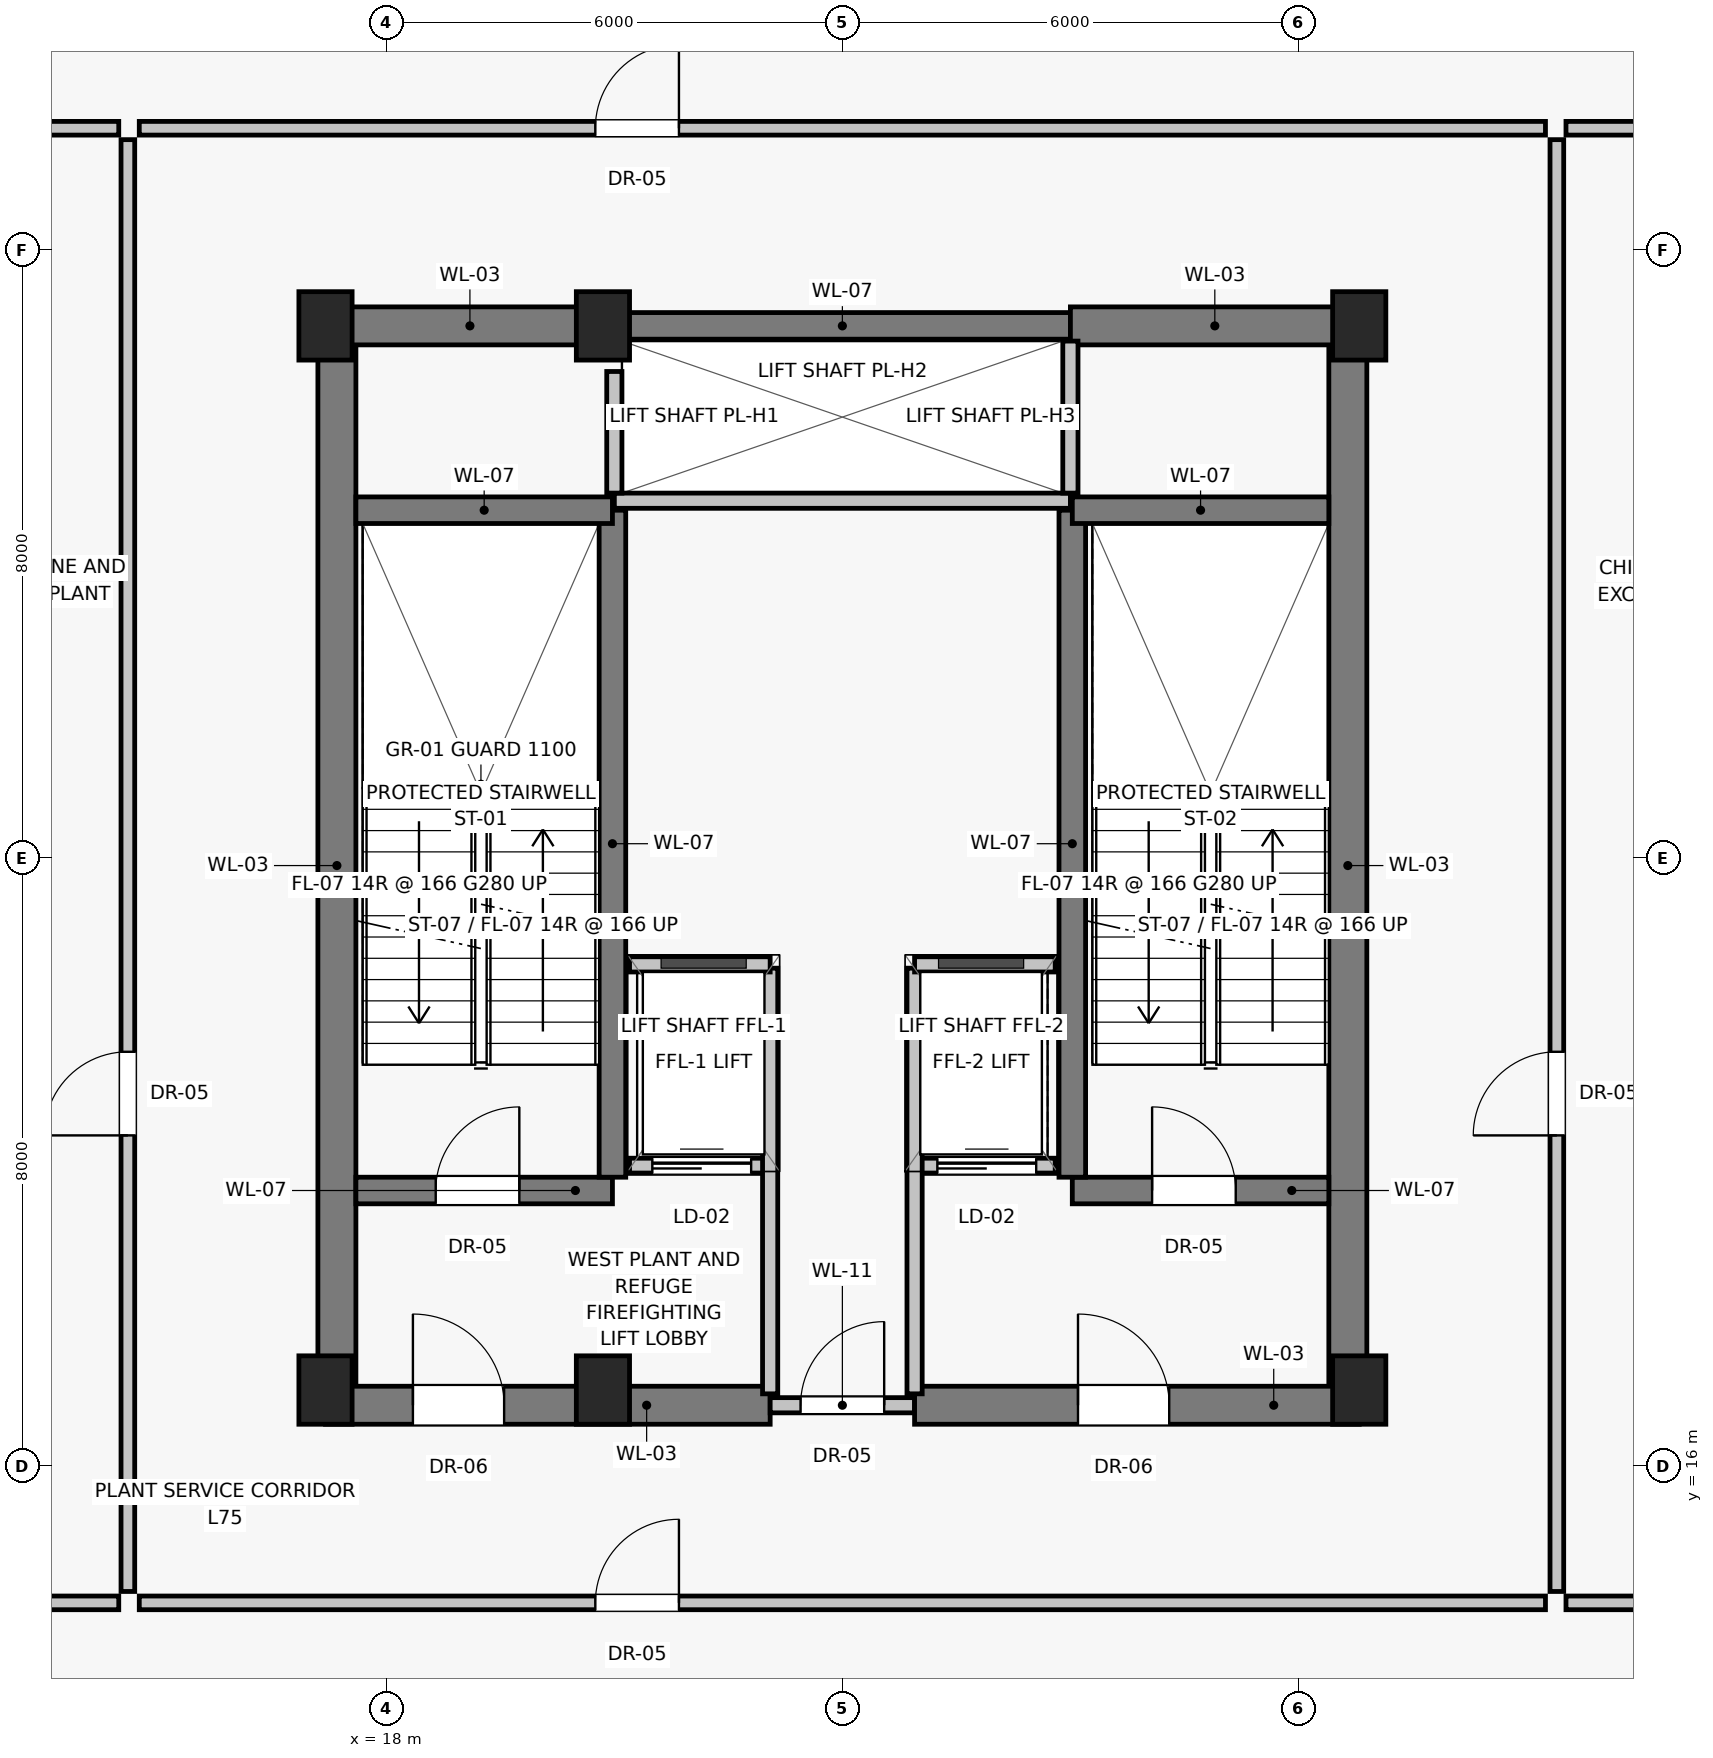
"""IFC4 building model, lengths in metres.
Left out: names, types, materials, properties, quantities, classifications, styles, units other than length and angle.
Written with IfcOpenShell. Run it as: python <this file> out.ifc"""

import sys

from ifc_helpers import new_model, si_unit, direction, frame, frame_2d, origin, origin_2d, place, context, subcontext, project, spatial, rectangle, extrude, source, transform, mapped, element, fill, save


model = new_model("IFC4")
c1 = context("Model", 3, precision=1e-05, world=origin(), true_north=direction((0.0, 1.0)))
c2 = subcontext(c1, "Body", "Model", "MODEL_VIEW")
j1 = project(units=[si_unit("LENGTHUNIT", "METRE"), si_unit("PLANEANGLEUNIT", "RADIAN")], contexts=[c1])
p1 = place(None, origin())
s1 = spatial("IfcSite", under=j1, at=p1, CompositionType="ELEMENT")
p2 = place(p1, origin())
s2 = spatial("IfcBuilding", under=s1, at=p2, CompositionType="ELEMENT")
p3 = place(p2, frame((0.0, 0.0, 264.25)))
s3 = spatial("IfcBuildingStorey", under=s2, at=p3, CompositionType="ELEMENT", Elevation=264.25)
for number, where, z_axis, x_axis in (
    (1, (17.2, 17.0, 0.0), (0.0, 0.0, 1.0), (1.0, 0.0, 0.0)),
    (2, (20.85, 17.0, 0.0), (0.0, 0.0, 1.0), (1.0, 0.0, 0.0)),
    (3, (30.8, 17.0, 0.0), (0.0, 0.0, 1.0), (1.0, 0.0, 0.0)),
    (4, (17.2, 31.0, 0.0), (0.0, 0.0, 1.0), (1.0, 0.0, 0.0)),
    (5, (20.85, 31.0, 0.0), (0.0, 0.0, 1.0), (1.0, 0.0, 0.0)),
    (6, (30.8, 31.0, 0.0), (0.0, 0.0, 1.0), (1.0, 0.0, 0.0)),
):
    element("IfcColumn", number, at=place(p3, frame(where, z_axis=z_axis, x_axis=x_axis)), inside=s3, PredefinedType="PILASTER", context=c2, shape_type="SweptSolid", body=[
        extrude(rectangle(XDim=0.7, YDim=0.9, at=origin_2d()), origin(), (0.0, 0.0, 1.0), 4.65),
    ])
for number, where, z_axis, x_axis in (
    (7, (17.35, 16.8, 0.0), (0.0, 0.0, 1.0), (0.0, 1.0, 0.0)),
    (8, (30.65, 16.8, 0.0), (0.0, 0.0, 1.0), (0.0, 1.0, 0.0)),
):
    element("IfcWall", number, at=place(p3, frame(where, z_axis=z_axis, x_axis=x_axis)), inside=s3, PredefinedType="SHEAR", context=c2, shape_type="SweptSolid", body=[
        extrude(rectangle(XDim=14.2, YDim=0.5, at=frame_2d((7.1, 0.0))), origin(), (0.0, 0.0, 1.0), 4.39),
    ])
p4 = place(p3, frame((17.2, 16.8, 0.0), z_axis=(0.0, 0.0, 1.0), x_axis=(1.0, 0.0, 0.0)))
e9 = element("IfcWall", 9, at=p4, inside=s3, PredefinedType="SHEAR", context=c2, shape_type="SweptSolid", body=[
    extrude(rectangle(XDim=5.85, YDim=0.5, at=frame_2d((2.925, 0.0))), origin(), (0.0, 0.0, 1.0), 4.39),
])
p5 = place(p4, frame((1.15, 0.0, 0.0)))
e10 = element("IfcOpeningElement", 10, at=p5, cuts=e9, PredefinedType="OPENING", context=c2, shape_type="SweptSolid", body=[
    extrude(rectangle(XDim=1.2, YDim=2.03, at=frame_2d((0.6, 1.015))), frame((0.0, 0.26, 0.0), z_axis=(0.0, -1.0, 0.0), x_axis=(1.0, 0.0, 0.0)), (0.0, 0.0, 1.0), 0.52),
])
p6 = place(p3, frame((23.05, 16.8, 0.0), z_axis=(0.0, 0.0, 1.0), x_axis=(1.0, 0.0, 0.0)))
e11 = element("IfcWall", 11, at=p6, inside=s3, PredefinedType="SOLIDWALL", context=c2, shape_type="SweptSolid", body=[
    extrude(rectangle(XDim=1.9, YDim=0.2, at=frame_2d((0.95, 0.0))), origin(), (0.0, 0.0, 1.0), 3.54),
])
p7 = place(p6, frame((0.4, 0.0, 0.0)))
e12 = element("IfcOpeningElement", 12, at=p7, cuts=e11, PredefinedType="OPENING", context=c2, shape_type="SweptSolid", body=[
    extrude(rectangle(XDim=1.1, YDim=2.03, at=frame_2d((0.55, 1.015))), frame((0.0, 0.11, 0.0), z_axis=(0.0, -1.0, 0.0), x_axis=(1.0, 0.0, 0.0)), (0.0, 0.0, 1.0), 0.22),
])
p8 = place(p3, frame((24.95, 16.8, 0.0), z_axis=(0.0, 0.0, 1.0), x_axis=(1.0, 0.0, 0.0)))
e13 = element("IfcWall", 13, at=p8, inside=s3, PredefinedType="SHEAR", context=c2, shape_type="SweptSolid", body=[
    extrude(rectangle(XDim=5.85, YDim=0.5, at=frame_2d((2.925, 0.0))), origin(), (0.0, 0.0, 1.0), 4.39),
])
p9 = place(p8, frame((2.15, 0.0, 0.0)))
e14 = element("IfcOpeningElement", 14, at=p9, cuts=e13, PredefinedType="OPENING", context=c2, shape_type="SweptSolid", body=[
    extrude(rectangle(XDim=1.2, YDim=2.03, at=frame_2d((0.6, 1.015))), frame((0.0, 0.26, 0.0), z_axis=(0.0, -1.0, 0.0), x_axis=(1.0, 0.0, 0.0)), (0.0, 0.0, 1.0), 0.52),
])
p10 = place(p3, frame((17.2, 31.0, 0.0), z_axis=(0.0, 0.0, 1.0), x_axis=(1.0, 0.0, 0.0)))
e15 = element("IfcWall", 15, at=p10, inside=s3, PredefinedType="SHEAR", context=c2, shape_type="SweptSolid", body=[
    extrude(rectangle(XDim=3.8, YDim=0.5, at=frame_2d((1.9, 0.0))), origin(), (0.0, 0.0, 1.0), 4.39),
])
p11 = place(p3, frame((21.0, 31.0, 0.0), z_axis=(0.0, 0.0, 1.0), x_axis=(1.0, 0.0, 0.0)))
e16 = element("IfcWall", 16, at=p11, inside=s3, PredefinedType="SHEAR", context=c2, shape_type="SweptSolid", body=[
    extrude(rectangle(XDim=6.0, YDim=0.35, at=frame_2d((3.0, 0.0))), origin(), (0.0, 0.0, 1.0), 4.39),
])
p12 = place(p3, frame((27.0, 31.0, 0.0), z_axis=(0.0, 0.0, 1.0), x_axis=(1.0, 0.0, 0.0)))
e17 = element("IfcWall", 17, at=p12, inside=s3, PredefinedType="SHEAR", context=c2, shape_type="SweptSolid", body=[
    extrude(rectangle(XDim=3.8, YDim=0.5, at=frame_2d((1.9, 0.0))), origin(), (0.0, 0.0, 1.0), 4.39),
])
p13 = place(p3, frame((17.6, 19.625, 0.0), z_axis=(0.0, 0.0, 1.0), x_axis=(1.0, 0.0, 0.0)))
e18 = element("IfcWall", 18, at=p13, inside=s3, PredefinedType="SHEAR", context=c2, shape_type="SweptSolid", body=[
    extrude(rectangle(XDim=3.375, YDim=0.35, at=frame_2d((1.688, 0.0))), origin(), (0.0, 0.0, 1.0), 4.39),
])
p14 = place(p13, frame((1.05, 0.0, 0.0)))
e19 = element("IfcOpeningElement", 19, at=p14, cuts=e18, PredefinedType="OPENING", context=c2, shape_type="SweptSolid", body=[
    extrude(rectangle(XDim=1.1, YDim=2.03, at=frame_2d((0.55, 1.015))), frame((0.0, 0.185, 0.0), z_axis=(0.0, -1.0, 0.0), x_axis=(1.0, 0.0, 0.0)), (0.0, 0.0, 1.0), 0.37),
])
p15 = place(p3, frame((21.2, 19.95, 0.0), z_axis=(0.0, 0.0, 1.0), x_axis=(1.0, 0.0, 0.0)))
e20 = element("IfcWall", 20, at=p15, inside=s3, PredefinedType="SOLIDWALL", context=c2, shape_type="SweptSolid", body=[
    extrude(rectangle(XDim=1.85, YDim=0.2, at=frame_2d((0.925, 0.0))), origin(), (0.0, 0.0, 1.0), 4.39),
])
p16 = place(p15, frame((0.3, 0.0, 0.0)))
e21 = element("IfcOpeningElement", 21, at=p16, cuts=e20, PredefinedType="OPENING", context=c2, shape_type="SweptSolid", body=[
    extrude(rectangle(XDim=1.3, YDim=2.25, at=frame_2d((0.65, 1.125))), frame((0.0, 0.11, 0.0), z_axis=(0.0, -1.0, 0.0), x_axis=(1.0, 0.0, 0.0)), (0.0, 0.0, 1.0), 0.22),
])
p17 = place(p3, frame((24.95, 19.95, 0.0), z_axis=(0.0, 0.0, 1.0), x_axis=(1.0, 0.0, 0.0)))
e22 = element("IfcWall", 22, at=p17, inside=s3, PredefinedType="SOLIDWALL", context=c2, shape_type="SweptSolid", body=[
    extrude(rectangle(XDim=1.85, YDim=0.2, at=frame_2d((0.925, 0.0))), origin(), (0.0, 0.0, 1.0), 4.39),
])
p18 = place(p17, frame((0.3, 0.0, 0.0)))
e23 = element("IfcOpeningElement", 23, at=p18, cuts=e22, PredefinedType="OPENING", context=c2, shape_type="SweptSolid", body=[
    extrude(rectangle(XDim=1.3, YDim=2.25, at=frame_2d((0.65, 1.125))), frame((0.0, 0.11, 0.0), z_axis=(0.0, -1.0, 0.0), x_axis=(1.0, 0.0, 0.0)), (0.0, 0.0, 1.0), 0.22),
])
p19 = place(p3, frame((27.025, 19.625, 0.0), z_axis=(0.0, 0.0, 1.0), x_axis=(1.0, 0.0, 0.0)))
e24 = element("IfcWall", 24, at=p19, inside=s3, PredefinedType="SHEAR", context=c2, shape_type="SweptSolid", body=[
    extrude(rectangle(XDim=3.375, YDim=0.35, at=frame_2d((1.688, 0.0))), origin(), (0.0, 0.0, 1.0), 4.39),
])
p20 = place(p19, frame((1.05, 0.0, 0.0)))
e25 = element("IfcOpeningElement", 25, at=p20, cuts=e24, PredefinedType="OPENING", context=c2, shape_type="SweptSolid", body=[
    extrude(rectangle(XDim=1.1, YDim=2.03, at=frame_2d((0.55, 1.015))), frame((0.0, 0.185, 0.0), z_axis=(0.0, -1.0, 0.0), x_axis=(1.0, 0.0, 0.0)), (0.0, 0.0, 1.0), 0.37),
])
for number, where, z_axis, x_axis in (
    (26, (20.975, 19.8, 0.0), (0.0, 0.0, 1.0), (0.0, 1.0, 0.0)),
    (27, (27.025, 19.8, 0.0), (0.0, 0.0, 1.0), (0.0, 1.0, 0.0)),
):
    element("IfcWall", number, at=place(p3, frame(where, z_axis=z_axis, x_axis=x_axis)), inside=s3, PredefinedType="SHEAR", context=c2, shape_type="SweptSolid", body=[
        extrude(rectangle(XDim=8.775, YDim=0.35, at=frame_2d((4.387, 0.0))), origin(), (0.0, 0.0, 1.0), 4.39),
    ])
for number, where, z_axis, x_axis in (
    (28, (17.6, 28.575, 0.0), (0.0, 0.0, 1.0), (1.0, 0.0, 0.0)),
    (29, (27.025, 28.575, 0.0), (0.0, 0.0, 1.0), (1.0, 0.0, 0.0)),
):
    element("IfcWall", number, at=place(p3, frame(where, z_axis=z_axis, x_axis=x_axis)), inside=s3, PredefinedType="SHEAR", context=c2, shape_type="SweptSolid", body=[
        extrude(rectangle(XDim=3.375, YDim=0.35, at=frame_2d((1.688, 0.0))), origin(), (0.0, 0.0, 1.0), 4.39),
    ])
for number, where, z_axis, x_axis in (
    (30, (23.05, 16.95, 0.0), (0.0, 0.0, 1.0), (0.0, 1.0, 0.0)),
    (31, (24.95, 16.95, 0.0), (0.0, 0.0, 1.0), (0.0, 1.0, 0.0)),
):
    element("IfcWall", number, at=place(p3, frame(where, z_axis=z_axis, x_axis=x_axis)), inside=s3, PredefinedType="SOLIDWALL", context=c2, shape_type="SweptSolid", body=[
        extrude(rectangle(XDim=5.6, YDim=0.2, at=frame_2d((2.8, 0.0))), origin(), (0.0, 0.0, 1.0), 4.39),
    ])
for number, where, z_axis, x_axis in (
    (32, (21.2, 22.6, 0.0), (0.0, 0.0, 1.0), (1.0, 0.0, 0.0)),
    (33, (24.95, 22.6, 0.0), (0.0, 0.0, 1.0), (1.0, 0.0, 0.0)),
):
    element("IfcWall", number, at=place(p3, frame(where, z_axis=z_axis, x_axis=x_axis)), inside=s3, PredefinedType="SOLIDWALL", context=c2, shape_type="SweptSolid", body=[
        extrude(rectangle(XDim=1.85, YDim=0.2, at=frame_2d((0.925, 0.0))), origin(), (0.0, 0.0, 1.0), 4.39),
    ])
p21 = place(p3, frame((21.0, 28.7, 0.0), z_axis=(0.0, 0.0, 1.0), x_axis=(1.0, 0.0, 0.0)))
e34 = element("IfcWall", 34, at=p21, inside=s3, PredefinedType="SOLIDWALL", context=c2, shape_type="SweptSolid", body=[
    extrude(rectangle(XDim=6.0, YDim=0.2, at=frame_2d((3.0, 0.0))), origin(), (0.0, 0.0, 1.0), 4.39),
])
p22 = place(p3, frame((21.0, 28.8, 0.0), z_axis=(0.0, 0.0, 1.0), x_axis=(0.0, 1.0, 0.0)))
e35 = element("IfcWall", 35, at=p22, inside=s3, PredefinedType="SOLIDWALL", context=c2, shape_type="SweptSolid", body=[
    extrude(rectangle(XDim=1.6, YDim=0.2, at=frame_2d((0.8, 0.0))), origin(), (0.0, 0.0, 1.0), 4.39),
])
p23 = place(p3, frame((27.0, 28.8, 0.0), z_axis=(0.0, 0.0, 1.0), x_axis=(0.0, 1.0, 0.0)))
e36 = element("IfcWall", 36, at=p23, inside=s3, PredefinedType="SOLIDWALL", context=c2, shape_type="SweptSolid", body=[
    extrude(rectangle(XDim=2.0, YDim=0.2, at=frame_2d((1.0, 0.0))), origin(), (0.0, 0.0, 1.0), 4.39),
])
p24 = place(p3, frame((14.75, 14.2, 0.0), z_axis=(0.0, 0.0, 1.0), x_axis=(1.0, 0.0, 0.0)))
e37 = element("IfcWall", 37, at=p24, inside=s3, PredefinedType="PARTITIONING", context=c2, shape_type="SweptSolid", body=[
    extrude(rectangle(XDim=18.5, YDim=0.18, at=frame_2d((9.25, 0.0))), origin(), (0.0, 0.0, 1.0), 4.39),
])
p25 = place(p24, frame((6.0, 0.0, 0.0)))
e38 = element("IfcOpeningElement", 38, at=p25, cuts=e37, PredefinedType="OPENING", context=c2, shape_type="SweptSolid", body=[
    extrude(rectangle(XDim=1.1, YDim=2.03, at=frame_2d((0.55, 1.015))), frame((0.0, 0.1, 0.0), z_axis=(0.0, -1.0, 0.0), x_axis=(1.0, 0.0, 0.0)), (0.0, 0.0, 1.0), 0.2),
])
p26 = place(p3, frame((33.4, 14.35, 0.0), z_axis=(0.0, 0.0, 1.0), x_axis=(0.0, 1.0, 0.0)))
e39 = element("IfcWall", 39, at=p26, inside=s3, PredefinedType="PARTITIONING", context=c2, shape_type="SweptSolid", body=[
    extrude(rectangle(XDim=19.1, YDim=0.18, at=frame_2d((9.55, 0.0))), origin(), (0.0, 0.0, 1.0), 4.39),
])
p27 = place(p26, frame((6.0, 0.0, 0.0)))
e40 = element("IfcOpeningElement", 40, at=p27, cuts=e39, PredefinedType="OPENING", context=c2, shape_type="SweptSolid", body=[
    extrude(rectangle(XDim=1.1, YDim=2.03, at=frame_2d((0.55, 1.015))), frame((0.0, 0.1, 0.0), z_axis=(0.0, -1.0, 0.0), x_axis=(1.0, 0.0, 0.0)), (0.0, 0.0, 1.0), 0.2),
])
p28 = place(p3, frame((14.75, 33.6, 0.0), z_axis=(0.0, 0.0, 1.0), x_axis=(1.0, 0.0, 0.0)))
e41 = element("IfcWall", 41, at=p28, inside=s3, PredefinedType="PARTITIONING", context=c2, shape_type="SweptSolid", body=[
    extrude(rectangle(XDim=18.5, YDim=0.18, at=frame_2d((9.25, 0.0))), origin(), (0.0, 0.0, 1.0), 4.39),
])
p29 = place(p28, frame((6.0, 0.0, 0.0)))
e42 = element("IfcOpeningElement", 42, at=p29, cuts=e41, PredefinedType="OPENING", context=c2, shape_type="SweptSolid", body=[
    extrude(rectangle(XDim=1.1, YDim=2.03, at=frame_2d((0.55, 1.015))), frame((0.0, 0.1, 0.0), z_axis=(0.0, -1.0, 0.0), x_axis=(1.0, 0.0, 0.0)), (0.0, 0.0, 1.0), 0.2),
])
p30 = place(p3, frame((14.6, 14.35, 0.0), z_axis=(0.0, 0.0, 1.0), x_axis=(0.0, 1.0, 0.0)))
e43 = element("IfcWall", 43, at=p30, inside=s3, PredefinedType="PARTITIONING", context=c2, shape_type="SweptSolid", body=[
    extrude(rectangle(XDim=19.1, YDim=0.18, at=frame_2d((9.55, 0.0))), origin(), (0.0, 0.0, 1.0), 4.39),
])
p31 = place(p30, frame((6.0, 0.0, 0.0)))
e44 = element("IfcOpeningElement", 44, at=p31, cuts=e43, PredefinedType="OPENING", context=c2, shape_type="SweptSolid", body=[
    extrude(rectangle(XDim=1.1, YDim=2.03, at=frame_2d((0.55, 1.015))), frame((0.0, 0.1, 0.0), z_axis=(0.0, -1.0, 0.0), x_axis=(1.0, 0.0, 0.0)), (0.0, 0.0, 1.0), 0.2),
])
for number, where, z_axis, x_axis in (
    (45, (11.17, 14.2, 0.0), (0.0, 0.0, 1.0), (1.0, 0.0, 0.0)),
    (46, (33.52, 14.2, 0.0), (0.0, 0.0, 1.0), (1.0, 0.0, 0.0)),
    (47, (11.17, 33.6, 0.0), (0.0, 0.0, 1.0), (1.0, 0.0, 0.0)),
    (48, (33.52, 33.6, 0.0), (0.0, 0.0, 1.0), (1.0, 0.0, 0.0)),
):
    element("IfcWall", number, at=place(p3, frame(where, z_axis=z_axis, x_axis=x_axis)), inside=s3, PredefinedType="PARTITIONING", context=c2, shape_type="SweptSolid", body=[
        extrude(rectangle(XDim=3.31, YDim=0.18, at=frame_2d((1.655, 0.0))), origin(), (0.0, 0.0, 1.0), 4.39),
    ])
m1 = source(origin(), c2, "Body", "SweptSolid", [
    extrude(rectangle(XDim=1.2, YDim=2.03, at=frame_2d((0.6, 1.015))), frame((0.0, 0.025, 0.0), z_axis=(0.0, -1.0, 0.0), x_axis=(1.0, 0.0, 0.0)), (0.0, 0.0, 1.0), 0.05),
])
p32 = place(p5, origin())
e49 = element("IfcDoor", 49, at=p32, inside=s3, OperationType="SINGLE_SWING_LEFT", PredefinedType="DOOR", context=c2, shape_type="MappedRepresentation", body=[
    mapped(m1, transform((0.0, 0.0, 0.0), scale=1.0)),
])
fill(e10, e49)
m2 = source(origin(), c2, "Body", "SweptSolid", [
    extrude(rectangle(XDim=1.1, YDim=2.03, at=frame_2d((0.55, 1.015))), frame((0.0, 0.025, 0.0), z_axis=(0.0, -1.0, 0.0), x_axis=(1.0, 0.0, 0.0)), (0.0, 0.0, 1.0), 0.05),
])
p33 = place(p7, origin())
e50 = element("IfcDoor", 50, at=p33, inside=s3, OperationType="SINGLE_SWING_RIGHT", PredefinedType="DOOR", context=c2, shape_type="MappedRepresentation", body=[
    mapped(m2, transform((0.0, 0.0, 0.0), scale=1.0)),
])
fill(e12, e50)
p34 = place(p9, origin())
e51 = element("IfcDoor", 51, at=p34, inside=s3, OperationType="SINGLE_SWING_LEFT", PredefinedType="DOOR", context=c2, shape_type="MappedRepresentation", body=[
    mapped(m1, transform((0.0, 0.0, 0.0), scale=1.0)),
])
fill(e14, e51)
p35 = place(p14, origin())
e52 = element("IfcDoor", 52, at=p35, inside=s3, OperationType="SINGLE_SWING_RIGHT", PredefinedType="DOOR", context=c2, shape_type="MappedRepresentation", body=[
    mapped(m2, transform((0.0, 0.0, 0.0), scale=1.0)),
])
fill(e19, e52)
m3 = source(origin(), c2, "Body", "SweptSolid", [
    extrude(rectangle(XDim=1.3, YDim=2.25, at=frame_2d((0.65, 1.125))), frame((0.0, 0.025, 0.0), z_axis=(0.0, -1.0, 0.0), x_axis=(1.0, 0.0, 0.0)), (0.0, 0.0, 1.0), 0.05),
])
p36 = place(p16, origin())
e53 = element("IfcDoor", 53, at=p36, inside=s3, OperationType="SLIDING_TO_LEFT", PredefinedType="DOOR", context=c2, shape_type="MappedRepresentation", body=[
    mapped(m3, transform((0.0, 0.0, 0.0), scale=1.0)),
])
fill(e21, e53)
p37 = place(p18, origin())
e54 = element("IfcDoor", 54, at=p37, inside=s3, OperationType="SLIDING_TO_LEFT", PredefinedType="DOOR", context=c2, shape_type="MappedRepresentation", body=[
    mapped(m3, transform((0.0, 0.0, 0.0), scale=1.0)),
])
fill(e23, e54)
p38 = place(p20, origin())
e55 = element("IfcDoor", 55, at=p38, inside=s3, OperationType="SINGLE_SWING_LEFT", PredefinedType="DOOR", context=c2, shape_type="MappedRepresentation", body=[
    mapped(m2, transform((0.0, 0.0, 0.0), scale=1.0)),
])
fill(e25, e55)
p39 = place(p25, origin())
e56 = element("IfcDoor", 56, at=p39, inside=s3, OperationType="SINGLE_SWING_RIGHT", PredefinedType="DOOR", context=c2, shape_type="MappedRepresentation", body=[
    mapped(m2, transform((0.0, 0.0, 0.0), scale=1.0)),
])
fill(e38, e56)
p40 = place(p27, origin())
e57 = element("IfcDoor", 57, at=p40, inside=s3, OperationType="SINGLE_SWING_LEFT", PredefinedType="DOOR", context=c2, shape_type="MappedRepresentation", body=[
    mapped(m2, transform((0.0, 0.0, 0.0), scale=1.0)),
])
fill(e40, e57)
p41 = place(p29, origin())
e58 = element("IfcDoor", 58, at=p41, inside=s3, OperationType="SINGLE_SWING_RIGHT", PredefinedType="DOOR", context=c2, shape_type="MappedRepresentation", body=[
    mapped(m2, transform((0.0, 0.0, 0.0), scale=1.0)),
])
fill(e42, e58)
p42 = place(p31, origin())
e59 = element("IfcDoor", 59, at=p42, inside=s3, OperationType="SINGLE_SWING_LEFT", PredefinedType="DOOR", context=c2, shape_type="MappedRepresentation", body=[
    mapped(m2, transform((0.0, 0.0, 0.0), scale=1.0)),
])
fill(e44, e59)
save(model, sys.argv[1])
